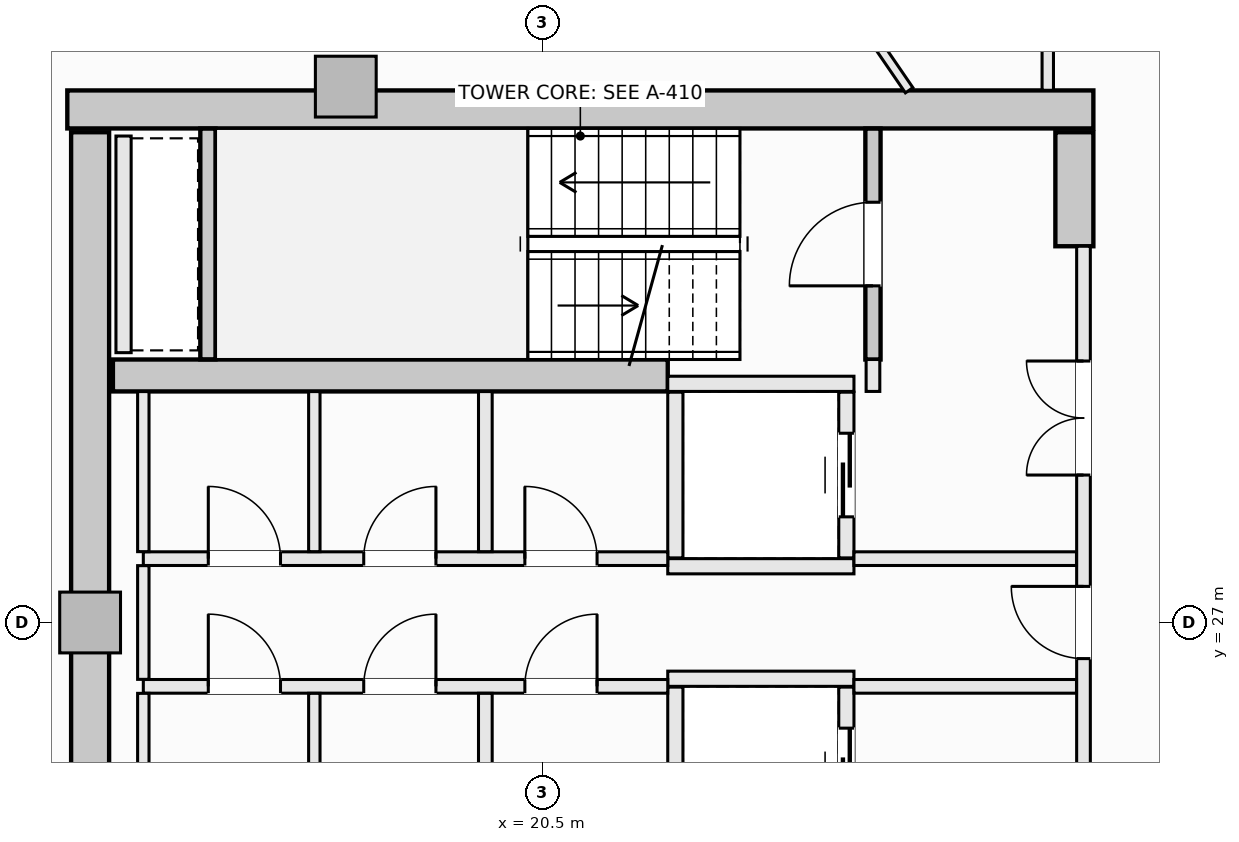
"""IFC4 building model, lengths in metres.
Left out: names, types, materials, properties, quantities, classifications, styles, units other than length and angle.
Written with IfcOpenShell. Run it as: python <this file> out.ifc"""

import sys

from ifc_helpers import new_model, si_unit, direction, frame, frame_2d, origin, origin_2d, place, context, subcontext, project, spatial, rectangle, extrude, element, fill, save


model = new_model("IFC4")
c1 = context("Model", 3, precision=1e-05, world=origin(), true_north=direction((0.0, 1.0)))
c2 = subcontext(c1, "Body", "Model", "MODEL_VIEW")
j1 = project(units=[si_unit("LENGTHUNIT", "METRE"), si_unit("PLANEANGLEUNIT", "RADIAN")], contexts=[c1])
p1 = place(None, origin())
s1 = spatial("IfcSite", under=j1, at=p1, CompositionType="ELEMENT")
p2 = place(p1, origin())
s2 = spatial("IfcBuilding", under=s1, at=p2, CompositionType="ELEMENT")
p3 = place(p2, frame((0.0, 0.0, 203.0)))
s3 = spatial("IfcBuildingStorey", under=s2, at=p3, CompositionType="ELEMENT", Elevation=203.0)
p4 = place(p3, frame((14.25, 33.75, -0.27), z_axis=(0.0, 0.0, 1.0), x_axis=(1.0, 0.0, 0.0)))
e1 = element("IfcWall", 1, at=p4, inside=s3, PredefinedType="SHEAR", context=c2, shape_type="SweptSolid", body=[
    extrude(rectangle(XDim=13.5, YDim=0.5, at=frame_2d((6.75, 0.0))), origin(), (0.0, 0.0, 1.0), 3.3),
])
p5 = place(p3, frame((14.55, 20.55, -0.27), z_axis=(0.0, 0.0, 1.0), x_axis=(0.0, 1.0, 0.0)))
e2 = element("IfcWall", 2, at=p5, inside=s3, PredefinedType="SHEAR", context=c2, shape_type="SweptSolid", body=[
    extrude(rectangle(XDim=12.9, YDim=0.5, at=frame_2d((6.45, 0.0))), origin(), (0.0, 0.0, 1.0), 3.3),
])
p6 = place(p3, frame((27.5, 31.95, -0.27), z_axis=(0.0, 0.0, 1.0), x_axis=(0.0, 1.0, 0.0)))
e3 = element("IfcWall", 3, at=p6, inside=s3, PredefinedType="SHEAR", context=c2, shape_type="SweptSolid", body=[
    extrude(rectangle(XDim=1.5, YDim=0.5, at=frame_2d((0.75, 0.0))), origin(), (0.0, 0.0, 1.0), 3.3),
])
p7 = place(p3, frame((14.85, 30.25, -0.27), z_axis=(0.0, 0.0, 1.0), x_axis=(1.0, 0.0, 0.0)))
e4 = element("IfcWall", 4, at=p7, inside=s3, PredefinedType="SHEAR", context=c2, shape_type="SweptSolid", body=[
    extrude(rectangle(XDim=7.3, YDim=0.42, at=frame_2d((3.65, 0.0))), origin(), (0.0, 0.0, 1.0), 3.3),
])
for number, where, z_axis, x_axis in (
    (5, (17.914, 34.05, -0.27), (0.0, 0.0, 1.0), (1.0, 0.0, 0.0)),
    (6, (14.55, 27.0, -0.27), (0.0, 0.0, 1.0), (1.0, 0.0, 0.0)),
):
    element("IfcColumn", number, at=place(p3, frame(where, z_axis=z_axis, x_axis=x_axis)), inside=s3, PredefinedType="PILASTER", context=c2, shape_type="SweptSolid", body=[
        extrude(rectangle(XDim=0.8, YDim=0.8, at=origin_2d()), origin(), (0.0, 0.0, 1.0), 3.3),
    ])
p8 = place(p3, frame((24.85, 30.46, -0.27), z_axis=(0.0, 0.0, 1.0), x_axis=(0.0, 1.0, 0.0)))
e7 = element("IfcWall", 7, at=p8, inside=s3, PredefinedType="SHEAR", context=c2, shape_type="SweptSolid", body=[
    extrude(rectangle(XDim=3.038, YDim=0.2, at=frame_2d((1.519, 0.0))), origin(), (0.0, 0.0, 1.0), 3.3),
])
p9 = place(p8, frame((0.969, 0.0, 0.27)))
e8 = element("IfcOpeningElement", 8, at=p9, cuts=e7, PredefinedType="OPENING", context=c2, shape_type="SweptSolid", body=[
    extrude(rectangle(XDim=1.1, YDim=2.15, at=frame_2d((0.55, 1.075))), frame((0.0, 0.11, 0.0), z_axis=(0.0, -1.0, 0.0), x_axis=(1.0, 0.0, 0.0)), (0.0, 0.0, 1.0), 0.22),
])
p10 = place(p3, frame((16.1, 30.462, -0.27), z_axis=(0.0, 0.0, 1.0), x_axis=(0.0, 1.0, 0.0)))
e9 = element("IfcWall", 9, at=p10, inside=s3, PredefinedType="SHEAR", context=c2, shape_type="SweptSolid", body=[
    extrude(rectangle(XDim=3.036, YDim=0.2, at=frame_2d((1.518, 0.0))), origin(), (0.0, 0.0, 1.0), 3.3),
])
for number, where, z_axis, x_axis in (
    (10, (22.15, 30.14, 0.0), (0.0, 0.0, 1.0), (1.0, 0.0, 0.0)),
    (11, (22.15, 27.74, 0.0), (0.0, 0.0, 1.0), (1.0, 0.0, 0.0)),
):
    element("IfcWall", number, at=place(p3, frame(where, z_axis=z_axis, x_axis=x_axis)), inside=s3, PredefinedType="SOLIDWALL", context=c2, shape_type="SweptSolid", body=[
        extrude(rectangle(XDim=2.45, YDim=0.2, at=frame_2d((1.225, 0.0))), origin(), (0.0, 0.0, 1.0), 3.03),
    ])
p11 = place(p3, frame((22.25, 27.85, 0.0), z_axis=(0.0, 0.0, 1.0), x_axis=(0.0, 1.0, 0.0)))
e12 = element("IfcWall", 12, at=p11, inside=s3, PredefinedType="SOLIDWALL", context=c2, shape_type="SweptSolid", body=[
    extrude(rectangle(XDim=2.18, YDim=0.2, at=frame_2d((1.09, 0.0))), origin(), (0.0, 0.0, 1.0), 3.03),
])
p12 = place(p3, frame((24.5, 27.85, 0.0), z_axis=(0.0, 0.0, 1.0), x_axis=(0.0, 1.0, 0.0)))
e13 = element("IfcWall", 13, at=p12, inside=s3, PredefinedType="SOLIDWALL", context=c2, shape_type="SweptSolid", body=[
    extrude(rectangle(XDim=2.18, YDim=0.2, at=frame_2d((1.09, 0.0))), origin(), (0.0, 0.0, 1.0), 3.03),
])
p13 = place(p12, frame((0.54, 0.0, 0.0)))
e14 = element("IfcOpeningElement", 14, at=p13, cuts=e13, PredefinedType="OPENING", context=c2, shape_type="SweptSolid", body=[
    extrude(rectangle(XDim=1.1, YDim=2.2, at=frame_2d((0.55, 1.1))), frame((0.0, 0.11, 0.0), z_axis=(0.0, -1.0, 0.0), x_axis=(1.0, 0.0, 0.0)), (0.0, 0.0, 1.0), 0.22),
])
p14 = place(p3, frame((22.15, 26.26, 0.0), z_axis=(0.0, 0.0, 1.0), x_axis=(1.0, 0.0, 0.0)))
e15 = element("IfcWall", 15, at=p14, inside=s3, PredefinedType="SOLIDWALL", context=c2, shape_type="SweptSolid", body=[
    extrude(rectangle(XDim=2.45, YDim=0.2, at=frame_2d((1.225, 0.0))), origin(), (0.0, 0.0, 1.0), 3.03),
])
p15 = place(p3, frame((22.25, 23.97, 0.0), z_axis=(0.0, 0.0, 1.0), x_axis=(0.0, 1.0, 0.0)))
e16 = element("IfcWall", 16, at=p15, inside=s3, PredefinedType="SOLIDWALL", context=c2, shape_type="SweptSolid", body=[
    extrude(rectangle(XDim=2.18, YDim=0.2, at=frame_2d((1.09, 0.0))), origin(), (0.0, 0.0, 1.0), 3.03),
])
p16 = place(p3, frame((24.5, 23.97, 0.0), z_axis=(0.0, 0.0, 1.0), x_axis=(0.0, 1.0, 0.0)))
e17 = element("IfcWall", 17, at=p16, inside=s3, PredefinedType="SOLIDWALL", context=c2, shape_type="SweptSolid", body=[
    extrude(rectangle(XDim=2.18, YDim=0.2, at=frame_2d((1.09, 0.0))), origin(), (0.0, 0.0, 1.0), 3.03),
])
p17 = place(p16, frame((0.54, 0.0, 0.0)))
e18 = element("IfcOpeningElement", 18, at=p17, cuts=e17, PredefinedType="OPENING", context=c2, shape_type="SweptSolid", body=[
    extrude(rectangle(XDim=1.1, YDim=2.2, at=frame_2d((0.55, 1.1))), frame((0.0, 0.11, 0.0), z_axis=(0.0, -1.0, 0.0), x_axis=(1.0, 0.0, 0.0)), (0.0, 0.0, 1.0), 0.22),
])
p18 = place(p3, frame((14.99, 30.55, 0.0), z_axis=(0.0, 0.0, 1.0), x_axis=(0.0, 1.0, 0.0)))
e19 = element("IfcWall", 19, at=p18, inside=s3, PredefinedType="SOLIDWALL", context=c2, shape_type="SweptSolid", body=[
    extrude(rectangle(XDim=2.85, YDim=0.2, at=frame_2d((1.425, 0.0))), origin(), (0.0, 0.0, 1.0), 3.03),
])
p19 = place(p3, frame((24.85, 30.04, 0.0), z_axis=(0.0, 0.0, 1.0), x_axis=(0.0, 1.0, 0.0)))
e20 = element("IfcWall", 20, at=p19, inside=s3, PredefinedType="SOLIDWALL", context=c2, shape_type="SweptSolid", body=[
    extrude(rectangle(XDim=0.42, YDim=0.18, at=frame_2d((0.21, 0.0))), origin(), (0.0, 0.0, 1.0), 3.03),
])
p20 = place(p3, frame((27.62, 22.05, 0.0), z_axis=(0.0, 0.0, 1.0), x_axis=(0.0, 1.0, 0.0)))
e21 = element("IfcWall", 21, at=p20, inside=s3, PredefinedType="SOLIDWALL", context=c2, shape_type="SweptSolid", body=[
    extrude(rectangle(XDim=9.9, YDim=0.18, at=frame_2d((4.95, 0.0))), origin(), (0.0, 0.0, 1.0), 3.03),
])
p21 = place(p20, frame((4.475, 0.0, 0.0)))
e22 = element("IfcOpeningElement", 22, at=p21, cuts=e21, PredefinedType="OPENING", context=c2, shape_type="SweptSolid", body=[
    extrude(rectangle(XDim=0.95, YDim=2.1, at=frame_2d((0.475, 1.05))), frame((0.0, 0.1, 0.0), z_axis=(0.0, -1.0, 0.0), x_axis=(1.0, 0.0, 0.0)), (0.0, 0.0, 1.0), 0.2),
])
p22 = place(p20, frame((6.89, 0.0, 0.0)))
e23 = element("IfcOpeningElement", 23, at=p22, cuts=e21, PredefinedType="OPENING", context=c2, shape_type="SweptSolid", body=[
    extrude(rectangle(XDim=1.5, YDim=2.2, at=frame_2d((0.75, 1.1))), frame((0.0, 0.1, 0.0), z_axis=(0.0, -1.0, 0.0), x_axis=(1.0, 0.0, 0.0)), (0.0, 0.0, 1.0), 0.2),
])
p23 = place(p20, frame((1.51, 0.0, 0.0)))
e24 = element("IfcOpeningElement", 24, at=p23, cuts=e21, PredefinedType="OPENING", context=c2, shape_type="SweptSolid", body=[
    extrude(rectangle(XDim=1.5, YDim=2.2, at=frame_2d((0.75, 1.1))), frame((0.0, 0.1, 0.0), z_axis=(0.0, -1.0, 0.0), x_axis=(1.0, 0.0, 0.0)), (0.0, 0.0, 1.0), 0.2),
])
p24 = place(p3, frame((15.25, 27.84, 0.0), z_axis=(0.0, 0.0, 1.0), x_axis=(1.0, 0.0, 0.0)))
e25 = element("IfcWall", 25, at=p24, inside=s3, PredefinedType="SOLIDWALL", context=c2, shape_type="SweptSolid", body=[
    extrude(rectangle(XDim=6.9, YDim=0.18, at=frame_2d((3.45, 0.0))), origin(), (0.0, 0.0, 1.0), 3.03),
])
p25 = place(p24, frame((5.02, 0.0, 0.0)))
e26 = element("IfcOpeningElement", 26, at=p25, cuts=e25, PredefinedType="OPENING", context=c2, shape_type="SweptSolid", body=[
    extrude(rectangle(XDim=0.95, YDim=2.1, at=frame_2d((0.475, 1.05))), frame((0.0, 0.1, 0.0), z_axis=(0.0, -1.0, 0.0), x_axis=(1.0, 0.0, 0.0)), (0.0, 0.0, 1.0), 0.2),
])
p26 = place(p24, frame((0.855, 0.0, 0.0)))
e27 = element("IfcOpeningElement", 27, at=p26, cuts=e25, PredefinedType="OPENING", context=c2, shape_type="SweptSolid", body=[
    extrude(rectangle(XDim=0.95, YDim=2.1, at=frame_2d((0.475, 1.05))), frame((0.0, 0.1, 0.0), z_axis=(0.0, -1.0, 0.0), x_axis=(1.0, 0.0, 0.0)), (0.0, 0.0, 1.0), 0.2),
])
p27 = place(p24, frame((2.9, 0.0, 0.0)))
e28 = element("IfcOpeningElement", 28, at=p27, cuts=e25, PredefinedType="OPENING", context=c2, shape_type="SweptSolid", body=[
    extrude(rectangle(XDim=0.95, YDim=2.1, at=frame_2d((0.475, 1.05))), frame((0.0, 0.1, 0.0), z_axis=(0.0, -1.0, 0.0), x_axis=(1.0, 0.0, 0.0)), (0.0, 0.0, 1.0), 0.2),
])
p28 = place(p3, frame((24.6, 27.84, 0.0), z_axis=(0.0, 0.0, 1.0), x_axis=(1.0, 0.0, 0.0)))
e29 = element("IfcWall", 29, at=p28, inside=s3, PredefinedType="SOLIDWALL", context=c2, shape_type="SweptSolid", body=[
    extrude(rectangle(XDim=2.928, YDim=0.18, at=frame_2d((1.464, 0.0))), origin(), (0.0, 0.0, 1.0), 3.03),
])
p29 = place(p3, frame((15.25, 26.16, 0.0), z_axis=(0.0, 0.0, 1.0), x_axis=(1.0, 0.0, 0.0)))
e30 = element("IfcWall", 30, at=p29, inside=s3, PredefinedType="SOLIDWALL", context=c2, shape_type="SweptSolid", body=[
    extrude(rectangle(XDim=6.9, YDim=0.18, at=frame_2d((3.45, 0.0))), origin(), (0.0, 0.0, 1.0), 3.03),
])
p30 = place(p29, frame((5.02, 0.0, 0.0)))
e31 = element("IfcOpeningElement", 31, at=p30, cuts=e30, PredefinedType="OPENING", context=c2, shape_type="SweptSolid", body=[
    extrude(rectangle(XDim=0.95, YDim=2.1, at=frame_2d((0.475, 1.05))), frame((0.0, 0.1, 0.0), z_axis=(0.0, -1.0, 0.0), x_axis=(1.0, 0.0, 0.0)), (0.0, 0.0, 1.0), 0.2),
])
p31 = place(p29, frame((0.855, 0.0, 0.0)))
e32 = element("IfcOpeningElement", 32, at=p31, cuts=e30, PredefinedType="OPENING", context=c2, shape_type="SweptSolid", body=[
    extrude(rectangle(XDim=0.95, YDim=2.1, at=frame_2d((0.475, 1.05))), frame((0.0, 0.1, 0.0), z_axis=(0.0, -1.0, 0.0), x_axis=(1.0, 0.0, 0.0)), (0.0, 0.0, 1.0), 0.2),
])
p32 = place(p29, frame((2.9, 0.0, 0.0)))
e33 = element("IfcOpeningElement", 33, at=p32, cuts=e30, PredefinedType="OPENING", context=c2, shape_type="SweptSolid", body=[
    extrude(rectangle(XDim=0.95, YDim=2.1, at=frame_2d((0.475, 1.05))), frame((0.0, 0.1, 0.0), z_axis=(0.0, -1.0, 0.0), x_axis=(1.0, 0.0, 0.0)), (0.0, 0.0, 1.0), 0.2),
])
p33 = place(p3, frame((24.6, 26.16, 0.0), z_axis=(0.0, 0.0, 1.0), x_axis=(1.0, 0.0, 0.0)))
e34 = element("IfcWall", 34, at=p33, inside=s3, PredefinedType="SOLIDWALL", context=c2, shape_type="SweptSolid", body=[
    extrude(rectangle(XDim=2.928, YDim=0.18, at=frame_2d((1.464, 0.0))), origin(), (0.0, 0.0, 1.0), 3.03),
])
p34 = place(p3, frame((15.25, 23.962, 0.0), z_axis=(0.0, 0.0, 1.0), x_axis=(0.0, 1.0, 0.0)))
e35 = element("IfcWall", 35, at=p34, inside=s3, PredefinedType="PARTITIONING", context=c2, shape_type="SweptSolid", body=[
    extrude(rectangle(XDim=2.106, YDim=0.15, at=frame_2d((1.053, 0.0))), origin(), (0.0, 0.0, 1.0), 3.03),
])
p35 = place(p3, frame((15.25, 26.252, 0.0), z_axis=(0.0, 0.0, 1.0), x_axis=(0.0, 1.0, 0.0)))
e36 = element("IfcWall", 36, at=p35, inside=s3, PredefinedType="PARTITIONING", context=c2, shape_type="SweptSolid", body=[
    extrude(rectangle(XDim=1.496, YDim=0.15, at=frame_2d((0.748, 0.0))), origin(), (0.0, 0.0, 1.0), 3.03),
])
p36 = place(p3, frame((15.25, 27.932, 0.0), z_axis=(0.0, 0.0, 1.0), x_axis=(0.0, 1.0, 0.0)))
e37 = element("IfcWall", 37, at=p36, inside=s3, PredefinedType="PARTITIONING", context=c2, shape_type="SweptSolid", body=[
    extrude(rectangle(XDim=2.106, YDim=0.15, at=frame_2d((1.053, 0.0))), origin(), (0.0, 0.0, 1.0), 3.03),
])
for number, where, z_axis, x_axis in (
    (38, (19.75, 23.962, 0.0), (0.0, 0.0, 1.0), (0.0, 1.0, 0.0)),
    (39, (19.75, 27.932, 0.0), (0.0, 0.0, 1.0), (0.0, 1.0, 0.0)),
):
    element("IfcWall", number, at=place(p3, frame(where, z_axis=z_axis, x_axis=x_axis)), inside=s3, PredefinedType="SOLIDWALL", context=c2, shape_type="SweptSolid", body=[
        extrude(rectangle(XDim=2.106, YDim=0.18, at=frame_2d((1.053, 0.0))), origin(), (0.0, 0.0, 1.0), 3.03),
    ])
for number, where, z_axis, x_axis in (
    (40, (17.5, 23.962, 0.0), (0.0, 0.0, 1.0), (0.0, 1.0, 0.0)),
    (41, (17.5, 27.932, 0.0), (0.0, 0.0, 1.0), (0.0, 1.0, 0.0)),
):
    element("IfcWall", number, at=place(p3, frame(where, z_axis=z_axis, x_axis=x_axis)), inside=s3, PredefinedType="PARTITIONING", context=c2, shape_type="SweptSolid", body=[
        extrude(rectangle(XDim=2.106, YDim=0.15, at=frame_2d((1.053, 0.0))), origin(), (0.0, 0.0, 1.0), 3.03),
    ])
p37 = place(p3, frame((27.15, 34.002, 0.0), z_axis=(0.0, 0.0, 1.0), x_axis=(0.0, 1.0, 0.0)))
e42 = element("IfcWall", 42, at=p37, inside=s3, PredefinedType="PARTITIONING", context=c2, shape_type="SweptSolid", body=[
    extrude(rectangle(XDim=4.198, YDim=0.15, at=frame_2d((2.099, 0.0))), origin(), (0.0, 0.0, 1.0), 3.03),
])
p38 = place(p37, frame((1.998, 0.0, 0.0)))
e43 = element("IfcOpeningElement", 43, at=p38, cuts=e42, PredefinedType="OPENING", context=c2, shape_type="SweptSolid", body=[
    extrude(rectangle(XDim=0.95, YDim=2.1, at=frame_2d((0.475, 1.05))), frame((0.0, 0.085, 0.0), z_axis=(0.0, -1.0, 0.0), x_axis=(1.0, 0.0, 0.0)), (0.0, 0.0, 1.0), 0.17),
])
p39 = place(p3, frame((24.586, 35.083, 0.0), z_axis=(0.0, 0.0, 1.0), x_axis=(0.565231440294, -0.824932372321, 0.0)))
e44 = element("IfcWall", 44, at=p39, inside=s3, PredefinedType="PARTITIONING", context=c2, shape_type="SweptSolid", body=[
    extrude(rectangle(XDim=1.311, YDim=0.12, at=frame_2d((0.655, 0.0))), origin(), (0.0, 0.0, 1.0), 3.03),
])
p40 = place(p9, origin())
e45 = element("IfcDoor", 45, at=p40, inside=s3, OperationType="SINGLE_SWING_LEFT", PredefinedType="DOOR", context=c2, shape_type="SweptSolid", body=[
    extrude(rectangle(XDim=1.1, YDim=2.15, at=frame_2d((0.55, 1.075))), frame((0.0, 0.025, 0.0), z_axis=(0.0, -1.0, 0.0), x_axis=(1.0, 0.0, 0.0)), (0.0, 0.0, 1.0), 0.05),
])
fill(e8, e45)
p41 = place(p13, origin())
e46 = element("IfcDoor", 46, at=p41, inside=s3, OperationType="SLIDING_TO_LEFT", PredefinedType="DOOR", context=c2, shape_type="SweptSolid", body=[
    extrude(rectangle(XDim=1.1, YDim=2.2, at=frame_2d((0.55, 1.1))), frame((0.0, 0.025, 0.0), z_axis=(0.0, -1.0, 0.0), x_axis=(1.0, 0.0, 0.0)), (0.0, 0.0, 1.0), 0.05),
])
fill(e14, e46)
p42 = place(p17, origin())
e47 = element("IfcDoor", 47, at=p42, inside=s3, OperationType="SLIDING_TO_LEFT", PredefinedType="DOOR", context=c2, shape_type="SweptSolid", body=[
    extrude(rectangle(XDim=1.1, YDim=2.2, at=frame_2d((0.55, 1.1))), frame((0.0, 0.025, 0.0), z_axis=(0.0, -1.0, 0.0), x_axis=(1.0, 0.0, 0.0)), (0.0, 0.0, 1.0), 0.05),
])
fill(e18, e47)
p43 = place(p21, origin())
e48 = element("IfcDoor", 48, at=p43, inside=s3, OperationType="SINGLE_SWING_RIGHT", PredefinedType="DOOR", context=c2, shape_type="SweptSolid", body=[
    extrude(rectangle(XDim=0.95, YDim=2.1, at=frame_2d((0.475, 1.05))), frame((0.0, 0.025, 0.0), z_axis=(0.0, -1.0, 0.0), x_axis=(1.0, 0.0, 0.0)), (0.0, 0.0, 1.0), 0.05),
])
fill(e22, e48)
p44 = place(p22, origin())
e49 = element("IfcDoor", 49, at=p44, inside=s3, OperationType="DOUBLE_DOOR_SINGLE_SWING", PredefinedType="DOOR", context=c2, shape_type="SweptSolid", body=[
    extrude(rectangle(XDim=1.5, YDim=2.2, at=frame_2d((0.75, 1.1))), frame((0.0, 0.025, 0.0), z_axis=(0.0, -1.0, 0.0), x_axis=(1.0, 0.0, 0.0)), (0.0, 0.0, 1.0), 0.05),
])
fill(e23, e49)
p45 = place(p25, origin())
e50 = element("IfcDoor", 50, at=p45, inside=s3, OperationType="SINGLE_SWING_LEFT", PredefinedType="DOOR", context=c2, shape_type="SweptSolid", body=[
    extrude(rectangle(XDim=0.95, YDim=2.1, at=frame_2d((0.475, 1.05))), frame((0.0, 0.025, 0.0), z_axis=(0.0, -1.0, 0.0), x_axis=(1.0, 0.0, 0.0)), (0.0, 0.0, 1.0), 0.05),
])
fill(e26, e50)
p46 = place(p30, origin())
e51 = element("IfcDoor", 51, at=p46, inside=s3, OperationType="SINGLE_SWING_RIGHT", PredefinedType="DOOR", context=c2, shape_type="SweptSolid", body=[
    extrude(rectangle(XDim=0.95, YDim=2.1, at=frame_2d((0.475, 1.05))), frame((0.0, 0.025, 0.0), z_axis=(0.0, -1.0, 0.0), x_axis=(1.0, 0.0, 0.0)), (0.0, 0.0, 1.0), 0.05),
])
fill(e31, e51)
p47 = place(p26, origin())
e52 = element("IfcDoor", 52, at=p47, inside=s3, OperationType="SINGLE_SWING_LEFT", PredefinedType="DOOR", context=c2, shape_type="SweptSolid", body=[
    extrude(rectangle(XDim=0.95, YDim=2.1, at=frame_2d((0.475, 1.05))), frame((0.0, 0.025, 0.0), z_axis=(0.0, -1.0, 0.0), x_axis=(1.0, 0.0, 0.0)), (0.0, 0.0, 1.0), 0.05),
])
fill(e27, e52)
p48 = place(p27, origin())
e53 = element("IfcDoor", 53, at=p48, inside=s3, OperationType="SINGLE_SWING_RIGHT", PredefinedType="DOOR", context=c2, shape_type="SweptSolid", body=[
    extrude(rectangle(XDim=0.95, YDim=2.1, at=frame_2d((0.475, 1.05))), frame((0.0, 0.025, 0.0), z_axis=(0.0, -1.0, 0.0), x_axis=(1.0, 0.0, 0.0)), (0.0, 0.0, 1.0), 0.05),
])
fill(e28, e53)
p49 = place(p31, origin())
e54 = element("IfcDoor", 54, at=p49, inside=s3, OperationType="SINGLE_SWING_LEFT", PredefinedType="DOOR", context=c2, shape_type="SweptSolid", body=[
    extrude(rectangle(XDim=0.95, YDim=2.1, at=frame_2d((0.475, 1.05))), frame((0.0, 0.025, 0.0), z_axis=(0.0, -1.0, 0.0), x_axis=(1.0, 0.0, 0.0)), (0.0, 0.0, 1.0), 0.05),
])
fill(e32, e54)
p50 = place(p32, origin())
e55 = element("IfcDoor", 55, at=p50, inside=s3, OperationType="SINGLE_SWING_RIGHT", PredefinedType="DOOR", context=c2, shape_type="SweptSolid", body=[
    extrude(rectangle(XDim=0.95, YDim=2.1, at=frame_2d((0.475, 1.05))), frame((0.0, 0.025, 0.0), z_axis=(0.0, -1.0, 0.0), x_axis=(1.0, 0.0, 0.0)), (0.0, 0.0, 1.0), 0.05),
])
fill(e33, e55)
save(model, sys.argv[1])
